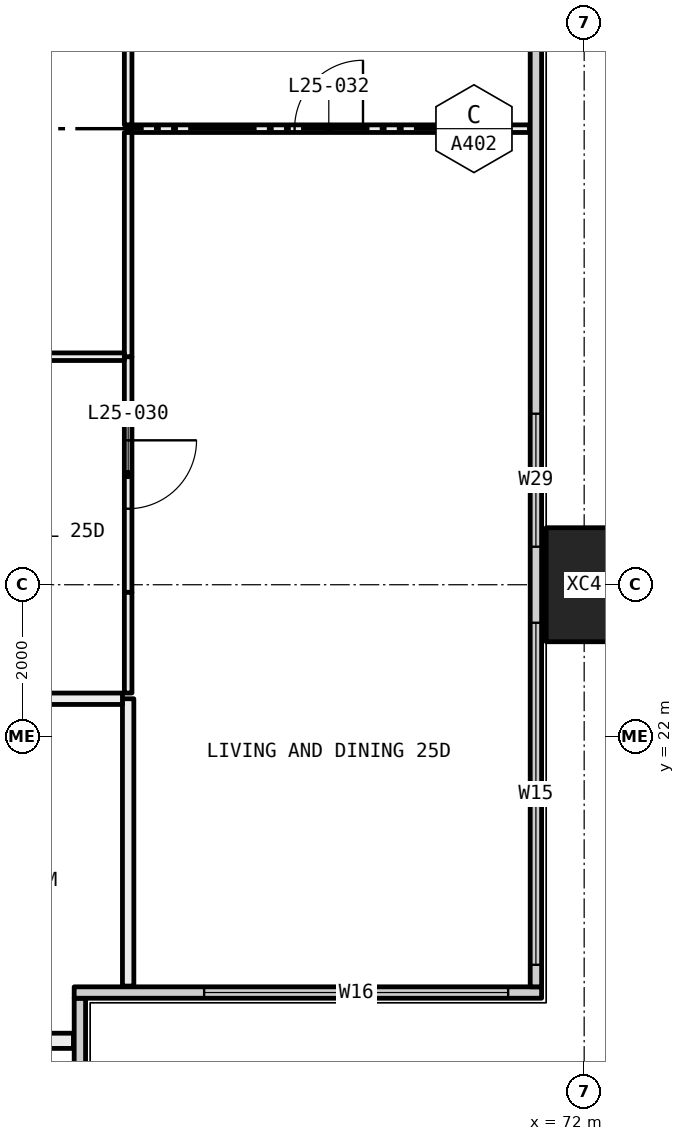
"""IFC4 building model, lengths in metres.
Left out: names, types, materials, properties, quantities, classifications, styles, units other than length and angle.
Written with IfcOpenShell. Run it as: python <this file> out.ifc"""

import sys

from ifc_helpers import new_model, si_unit, direction, frame, frame_2d, origin, origin_2d, place, context, subcontext, project, spatial, rectangle, hollow_rectangle, extrude, element, fill, save


model = new_model("IFC4")
c1 = context("Model", 3, precision=1e-05, world=origin(), true_north=direction((0.0, 1.0)))
c2 = subcontext(c1, "Body", "Model", "MODEL_VIEW")
j1 = project(units=[si_unit("LENGTHUNIT", "METRE"), si_unit("PLANEANGLEUNIT", "RADIAN")], contexts=[c1])
p1 = place(None, origin())
s1 = spatial("IfcSite", under=j1, at=p1, CompositionType="ELEMENT")
p2 = place(p1, origin())
s2 = spatial("IfcBuilding", under=s1, at=p2, CompositionType="ELEMENT")
p3 = place(p2, frame((0.0, 0.0, 100.05)))
s3 = spatial("IfcBuildingStorey", under=s2, at=p3, CompositionType="ELEMENT", Elevation=100.05)
p4 = place(p3, frame((72.0, 24.0, -0.4), z_axis=(0.0, 0.0, 1.0), x_axis=(0.0, 1.0, 0.0)))
e1 = element("IfcColumn", 1, at=p4, inside=s3, PredefinedType="COLUMN", context=c2, shape_type="SweptSolid", body=[
    extrude(hollow_rectangle(XDim=1.5, YDim=1.0, WallThickness=0.06, at=origin_2d()), origin(), (0.0, 0.0, 1.0), 3.45),
])
p5 = place(p3, frame((65.365, 12.71, 0.0), z_axis=(0.0, 0.0, 1.0), x_axis=(0.0, 1.0, 0.0)))
e2 = element("IfcWall", 2, at=p5, inside=s3, PredefinedType="ELEMENTEDWALL", context=c2, shape_type="SweptSolid", body=[
    extrude(rectangle(XDim=5.85, YDim=0.15, at=frame_2d((2.925, 0.0))), origin(), (0.0, 0.0, 1.0), 3.05),
])
p6 = place(p5, frame((0.29, 0.0, 0.45)))
e3 = element("IfcOpeningElement", 3, at=p6, cuts=e2, PredefinedType="OPENING", context=c2, shape_type="SweptSolid", body=[
    extrude(rectangle(XDim=4.0, YDim=2.55, at=frame_2d((2.0, 1.275))), frame((0.0, 0.085, 0.0), z_axis=(0.0, -1.0, 0.0), x_axis=(1.0, 0.0, 0.0)), (0.0, 0.0, 1.0), 0.17),
])
p7 = place(p3, frame((65.29, 18.635, 0.0), z_axis=(0.0, 0.0, 1.0), x_axis=(1.0, 0.0, 0.0)))
e4 = element("IfcWall", 4, at=p7, inside=s3, PredefinedType="ELEMENTEDWALL", context=c2, shape_type="SweptSolid", body=[
    extrude(rectangle(XDim=6.15, YDim=0.15, at=frame_2d((3.075, 0.0))), origin(), (0.0, 0.0, 1.0), 3.05),
])
p8 = place(p7, frame((1.71, 0.0, 0.45)))
e5 = element("IfcOpeningElement", 5, at=p8, cuts=e4, PredefinedType="OPENING", context=c2, shape_type="SweptSolid", body=[
    extrude(rectangle(XDim=4.0, YDim=2.55, at=frame_2d((2.0, 1.275))), frame((0.0, 0.085, 0.0), z_axis=(0.0, -1.0, 0.0), x_axis=(1.0, 0.0, 0.0)), (0.0, 0.0, 1.0), 0.17),
])
p9 = place(p3, frame((71.365, 18.71, 0.0), z_axis=(0.0, 0.0, 1.0), x_axis=(0.0, 1.0, 0.0)))
e6 = element("IfcWall", 6, at=p9, inside=s3, PredefinedType="ELEMENTEDWALL", context=c2, shape_type="SweptSolid", body=[
    extrude(rectangle(XDim=22.58, YDim=0.15, at=frame_2d((11.29, 0.0))), origin(), (0.0, 0.0, 1.0), 3.05),
])
p10 = place(p9, frame((0.29, 0.0, 0.45)))
e7 = element("IfcOpeningElement", 7, at=p10, cuts=e6, PredefinedType="OPENING", context=c2, shape_type="SweptSolid", body=[
    extrude(rectangle(XDim=4.5, YDim=2.55, at=frame_2d((2.25, 1.275))), frame((0.0, 0.085, 0.0), z_axis=(0.0, -1.0, 0.0), x_axis=(1.0, 0.0, 0.0)), (0.0, 0.0, 1.0), 0.17),
])
p11 = place(p9, frame((5.79, 0.0, 0.45)))
e8 = element("IfcOpeningElement", 8, at=p11, cuts=e6, PredefinedType="OPENING", context=c2, shape_type="SweptSolid", body=[
    extrude(rectangle(XDim=1.75, YDim=2.55, at=frame_2d((0.875, 1.275))), frame((0.0, 0.085, 0.0), z_axis=(0.0, -1.0, 0.0), x_axis=(1.0, 0.0, 0.0)), (0.0, 0.0, 1.0), 0.17),
])
p12 = place(p9, frame((15.04, 0.0, 0.45)))
e9 = element("IfcOpeningElement", 9, at=p12, cuts=e6, PredefinedType="OPENING", context=c2, shape_type="SweptSolid", body=[
    extrude(rectangle(XDim=1.75, YDim=2.55, at=frame_2d((0.875, 1.275))), frame((0.0, 0.085, 0.0), z_axis=(0.0, -1.0, 0.0), x_axis=(1.0, 0.0, 0.0)), (0.0, 0.0, 1.0), 0.17),
])
p13 = place(p9, frame((17.79, 0.0, 0.45)))
e10 = element("IfcOpeningElement", 10, at=p13, cuts=e6, PredefinedType="OPENING", context=c2, shape_type="SweptSolid", body=[
    extrude(rectangle(XDim=4.5, YDim=2.55, at=frame_2d((2.25, 1.275))), frame((0.0, 0.085, 0.0), z_axis=(0.0, -1.0, 0.0), x_axis=(1.0, 0.0, 0.0)), (0.0, 0.0, 1.0), 0.17),
])
p14 = place(p3, frame((65.28, 18.0, 0.0), z_axis=(0.0, 0.0, 1.0), x_axis=(-1.0, 0.0, 0.0)))
e11 = element("IfcWall", 11, at=p14, inside=s3, PredefinedType="PARTITIONING", context=c2, shape_type="SweptSolid", body=[
    extrude(rectangle(XDim=3.38, YDim=0.2, at=frame_2d((1.69, 0.0))), origin(), (0.0, 0.0, 1.0), 3.05),
])
p15 = place(p3, frame((71.28, 30.0, 0.0), z_axis=(0.0, 0.0, 1.0), x_axis=(-1.0, 0.0, 0.0)))
e12 = element("IfcWall", 12, at=p15, inside=s3, PredefinedType="PARTITIONING", context=c2, shape_type="SweptSolid", body=[
    extrude(rectangle(XDim=5.28, YDim=0.1, at=frame_2d((2.64, 0.0))), origin(), (0.0, 0.0, 1.0), 3.05),
])
p16 = place(p15, frame((2.19, 0.0, 0.0)))
e13 = element("IfcOpeningElement", 13, at=p16, cuts=e12, PredefinedType="OPENING", context=c2, shape_type="SweptSolid", body=[
    extrude(rectangle(XDim=0.9, YDim=2.1, at=frame_2d((0.45, 1.05))), frame((0.0, 0.06, 0.0), z_axis=(0.0, -1.0, 0.0), x_axis=(1.0, 0.0, 0.0)), (0.0, 0.0, 1.0), 0.12),
])
p17 = place(p3, frame((66.0, 22.5, 0.0), z_axis=(0.0, 0.0, 1.0), x_axis=(0.0, -1.0, 0.0)))
e14 = element("IfcWall", 14, at=p17, inside=s3, PredefinedType="PARTITIONING", context=c2, shape_type="SweptSolid", body=[
    extrude(rectangle(XDim=3.78, YDim=0.15, at=frame_2d((1.89, 0.0))), origin(), (0.0, 0.0, 1.0), 3.05),
])
p18 = place(p3, frame((66.0, 27.0, 0.0), z_axis=(0.0, 0.0, 1.0), x_axis=(0.0, -1.0, 0.0)))
e15 = element("IfcWall", 15, at=p18, inside=s3, PredefinedType="PARTITIONING", context=c2, shape_type="SweptSolid", body=[
    extrude(rectangle(XDim=3.1, YDim=0.1, at=frame_2d((1.55, 0.0))), origin(), (0.0, 0.0, 1.0), 2.45),
])
p19 = place(p18, frame((1.1, 0.0, 0.0)))
e16 = element("IfcOpeningElement", 16, at=p19, cuts=e15, PredefinedType="OPENING", context=c2, shape_type="SweptSolid", body=[
    extrude(rectangle(XDim=0.9, YDim=2.1, at=frame_2d((0.45, 1.05))), frame((0.0, 0.06, 0.0), z_axis=(0.0, -1.0, 0.0), x_axis=(1.0, 0.0, 0.0)), (0.0, 0.0, 1.0), 0.12),
])
p20 = place(p3, frame((66.0, 23.9, 0.0), z_axis=(0.0, 0.0, 1.0), x_axis=(0.0, -1.0, 0.0)))
e17 = element("IfcWall", 17, at=p20, inside=s3, PredefinedType="PARTITIONING", context=c2, shape_type="SweptSolid", body=[
    extrude(rectangle(XDim=1.325, YDim=0.1, at=frame_2d((0.663, 0.0))), origin(), (0.0, 0.0, 1.0), 3.05),
])
p21 = place(p3, frame((66.0, 29.95, 0.0), z_axis=(0.0, 0.0, 1.0), x_axis=(0.0, -1.0, 0.0)))
e18 = element("IfcWall", 18, at=p21, inside=s3, PredefinedType="PARTITIONING", context=c2, shape_type="SweptSolid", body=[
    extrude(rectangle(XDim=2.95, YDim=0.1, at=frame_2d((1.475, 0.0))), origin(), (0.0, 0.0, 1.0), 3.05),
])
p22 = place(p3, frame((66.0, 35.95, 0.0), z_axis=(0.0, 0.0, 1.0), x_axis=(0.0, -1.0, 0.0)))
e19 = element("IfcWall", 19, at=p22, inside=s3, PredefinedType="PARTITIONING", context=c2, shape_type="SweptSolid", body=[
    extrude(rectangle(XDim=5.9, YDim=0.1, at=frame_2d((2.95, 0.0))), origin(), (0.0, 0.0, 1.0), 2.45),
])
p23 = place(p3, frame((65.925, 22.5, 0.0), z_axis=(0.0, 0.0, 1.0), x_axis=(-1.0, 0.0, 0.0)))
e20 = element("IfcWall", 20, at=p23, inside=s3, PredefinedType="PARTITIONING", context=c2, shape_type="SweptSolid", body=[
    extrude(rectangle(XDim=3.925, YDim=0.15, at=frame_2d((1.962, 0.0))), origin(), (0.0, 0.0, 1.0), 3.05),
])
p24 = place(p23, frame((1.512, 0.0, 0.0)))
e21 = element("IfcOpeningElement", 21, at=p24, cuts=e20, PredefinedType="OPENING", context=c2, shape_type="SweptSolid", body=[
    extrude(rectangle(XDim=0.9, YDim=2.1, at=frame_2d((0.45, 1.05))), frame((0.0, 0.085, 0.0), z_axis=(0.0, -1.0, 0.0), x_axis=(1.0, 0.0, 0.0)), (0.0, 0.0, 1.0), 0.17),
])
p25 = place(p3, frame((65.95, 27.0, 0.0), z_axis=(0.0, 0.0, 1.0), x_axis=(-1.0, 0.0, 0.0)))
e22 = element("IfcWall", 22, at=p25, inside=s3, PredefinedType="PARTITIONING", context=c2, shape_type="SweptSolid", body=[
    extrude(rectangle(XDim=3.95, YDim=0.1, at=frame_2d((1.975, 0.0))), origin(), (0.0, 0.0, 1.0), 3.05),
])
p26 = place(p25, frame((1.525, 0.0, 0.0)))
e23 = element("IfcOpeningElement", 23, at=p26, cuts=e22, PredefinedType="OPENING", context=c2, shape_type="SweptSolid", body=[
    extrude(rectangle(XDim=0.9, YDim=2.1, at=frame_2d((0.45, 1.05))), frame((0.0, 0.06, 0.0), z_axis=(0.0, -1.0, 0.0), x_axis=(1.0, 0.0, 0.0)), (0.0, 0.0, 1.0), 0.12),
])
p27 = place(p8, origin())
e24 = element("IfcWindow", 24, at=p27, inside=s3, PartitioningType="SINGLE_PANEL", PredefinedType="WINDOW", context=c2, shape_type="SweptSolid", body=[
    extrude(rectangle(XDim=4.0, YDim=2.55, at=frame_2d((2.0, 1.275))), frame((0.0, 0.03, 0.0), z_axis=(0.0, -1.0, 0.0), x_axis=(1.0, 0.0, 0.0)), (0.0, 0.0, 1.0), 0.06),
])
fill(e5, e24)
p28 = place(p10, origin())
e25 = element("IfcWindow", 25, at=p28, inside=s3, PartitioningType="SINGLE_PANEL", PredefinedType="WINDOW", context=c2, shape_type="SweptSolid", body=[
    extrude(rectangle(XDim=4.5, YDim=2.55, at=frame_2d((2.25, 1.275))), frame((0.0, 0.03, 0.0), z_axis=(0.0, -1.0, 0.0), x_axis=(1.0, 0.0, 0.0)), (0.0, 0.0, 1.0), 0.06),
])
fill(e7, e25)
p29 = place(p11, origin())
e26 = element("IfcWindow", 26, at=p29, inside=s3, PartitioningType="SINGLE_PANEL", PredefinedType="WINDOW", context=c2, shape_type="SweptSolid", body=[
    extrude(rectangle(XDim=1.75, YDim=2.55, at=frame_2d((0.875, 1.275))), frame((0.0, 0.03, 0.0), z_axis=(0.0, -1.0, 0.0), x_axis=(1.0, 0.0, 0.0)), (0.0, 0.0, 1.0), 0.06),
])
fill(e8, e26)
p30 = place(p19, origin())
e27 = element("IfcDoor", 27, at=p30, inside=s3, OperationType="SINGLE_SWING_RIGHT", PredefinedType="DOOR", context=c2, shape_type="SweptSolid", body=[
    extrude(rectangle(XDim=0.9, YDim=2.1, at=frame_2d((0.45, 1.05))), frame((0.0, 0.025, 0.0), z_axis=(0.0, -1.0, 0.0), x_axis=(1.0, 0.0, 0.0)), (0.0, 0.0, 1.0), 0.05),
])
fill(e16, e27)
p31 = place(p16, frame((0.9, 0.0, 0.0), x_axis=(-1.0, 0.0, 0.0)))
e28 = element("IfcDoor", 28, at=p31, inside=s3, OperationType="SINGLE_SWING_LEFT", PredefinedType="DOOR", context=c2, shape_type="SweptSolid", body=[
    extrude(rectangle(XDim=0.9, YDim=2.1, at=frame_2d((0.45, 1.05))), frame((0.0, 0.025, 0.0), z_axis=(0.0, -1.0, 0.0), x_axis=(1.0, 0.0, 0.0)), (0.0, 0.0, 1.0), 0.05),
])
fill(e13, e28)
save(model, sys.argv[1])
